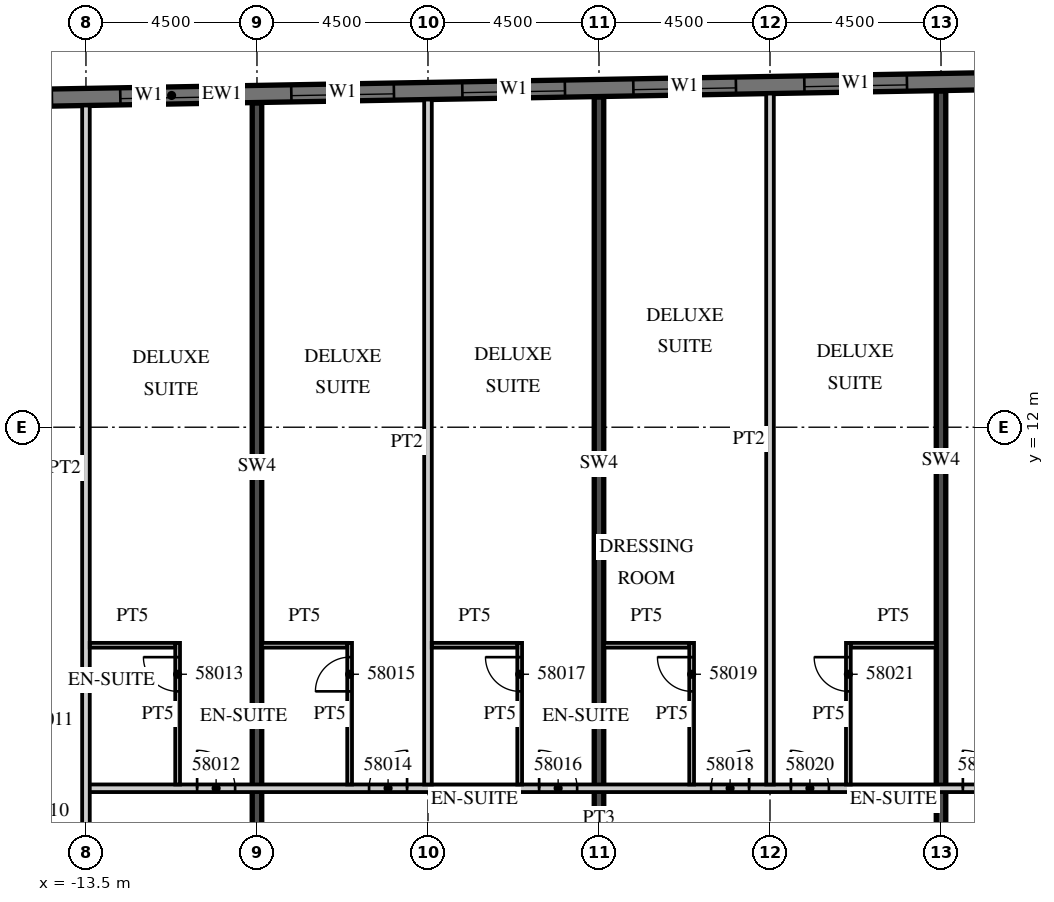
"""IFC4 building model, lengths in metres.
Left out: names, types, materials, properties, quantities, classifications, styles, units other than length and angle.
Written with IfcOpenShell. Run it as: python <this file> out.ifc"""

import sys

from ifc_helpers import new_model, si_unit, direction, frame, frame_2d, origin, place, context, subcontext, project, spatial, rectangle, extrude, element, fill, save


model = new_model("IFC4")
c1 = context("Model", 3, precision=1e-05, world=origin(), true_north=direction((0.0, 1.0)))
c2 = subcontext(c1, "Body", "Model", "MODEL_VIEW")
j1 = project(units=[si_unit("LENGTHUNIT", "METRE"), si_unit("PLANEANGLEUNIT", "RADIAN")], contexts=[c1])
p1 = place(None, origin())
s1 = spatial("IfcSite", under=j1, at=p1, CompositionType="ELEMENT")
p2 = place(p1, origin())
s2 = spatial("IfcBuilding", under=s1, at=p2, CompositionType="ELEMENT")
p3 = place(p2, frame((0.0, 0.0, 237.5)))
s3 = spatial("IfcBuildingStorey", under=s2, at=p3, CompositionType="ELEMENT", Elevation=237.5)
p4 = place(p3, frame((-9.0, 1.4, 0.0), z_axis=(0.0, 0.0, 1.0), x_axis=(0.0, 1.0, 0.0)))
e1 = element("IfcWall", 1, at=p4, inside=s3, PredefinedType="SHEAR", context=c2, shape_type="SweptSolid", body=[
    extrude(rectangle(XDim=19.132, YDim=0.25, at=frame_2d((9.566, 0.0))), origin(), (0.0, 0.0, 1.0), 3.3),
])
p5 = place(p3, frame((0.0, 1.4, 0.0), z_axis=(0.0, 0.0, 1.0), x_axis=(0.0, 1.0, 0.0)))
e2 = element("IfcWall", 2, at=p5, inside=s3, PredefinedType="SHEAR", context=c2, shape_type="SweptSolid", body=[
    extrude(rectangle(XDim=19.289, YDim=0.25, at=frame_2d((9.644, 0.0))), origin(), (0.0, 0.0, 1.0), 3.3),
])
p6 = place(p3, frame((9.0, 1.4, 0.0), z_axis=(0.0, 0.0, 1.0), x_axis=(0.0, 1.0, 0.0)))
e3 = element("IfcWall", 3, at=p6, inside=s3, PredefinedType="SHEAR", context=c2, shape_type="SweptSolid", body=[
    extrude(rectangle(XDim=19.446, YDim=0.25, at=frame_2d((9.723, 0.0))), origin(), (0.0, 0.0, 1.0), 3.3),
])
p7 = place(p3, frame((13.504, 21.161, 0.0), z_axis=(0.0, 0.0, 1.0), x_axis=(-0.999847763257, -0.017448504532, 0.0)))
e4 = element("IfcWall", 4, at=p7, inside=s3, PredefinedType="SOLIDWALL", context=c2, shape_type="SweptSolid", body=[
    extrude(rectangle(XDim=46.859, YDim=0.45, at=frame_2d((23.43, 0.0))), origin(), (0.0, 0.0, 1.0), 3.02),
])
p8 = place(p7, frame((0.9, 0.0, 0.45)))
e5 = element("IfcOpeningElement", 5, at=p8, cuts=e4, PredefinedType="OPENING", context=c2, shape_type="SweptSolid", body=[
    extrude(rectangle(XDim=2.7, YDim=2.25, at=frame_2d((1.35, 1.125))), frame((0.0, 0.235, 0.0), z_axis=(0.0, -1.0, 0.0), x_axis=(1.0, 0.0, 0.0)), (0.0, 0.0, 1.0), 0.47),
])
p9 = place(p7, frame((5.401, 0.0, 0.45)))
e6 = element("IfcOpeningElement", 6, at=p9, cuts=e4, PredefinedType="OPENING", context=c2, shape_type="SweptSolid", body=[
    extrude(rectangle(XDim=2.7, YDim=2.25, at=frame_2d((1.35, 1.125))), frame((0.0, 0.235, 0.0), z_axis=(0.0, -1.0, 0.0), x_axis=(1.0, 0.0, 0.0)), (0.0, 0.0, 1.0), 0.47),
])
p10 = place(p7, frame((9.902, 0.0, 0.45)))
e7 = element("IfcOpeningElement", 7, at=p10, cuts=e4, PredefinedType="OPENING", context=c2, shape_type="SweptSolid", body=[
    extrude(rectangle(XDim=2.7, YDim=2.25, at=frame_2d((1.35, 1.125))), frame((0.0, 0.235, 0.0), z_axis=(0.0, -1.0, 0.0), x_axis=(1.0, 0.0, 0.0)), (0.0, 0.0, 1.0), 0.47),
])
p11 = place(p7, frame((14.402, 0.0, 0.45)))
e8 = element("IfcOpeningElement", 8, at=p11, cuts=e4, PredefinedType="OPENING", context=c2, shape_type="SweptSolid", body=[
    extrude(rectangle(XDim=2.7, YDim=2.25, at=frame_2d((1.35, 1.125))), frame((0.0, 0.235, 0.0), z_axis=(0.0, -1.0, 0.0), x_axis=(1.0, 0.0, 0.0)), (0.0, 0.0, 1.0), 0.47),
])
p12 = place(p7, frame((18.903, 0.0, 0.45)))
e9 = element("IfcOpeningElement", 9, at=p12, cuts=e4, PredefinedType="OPENING", context=c2, shape_type="SweptSolid", body=[
    extrude(rectangle(XDim=2.7, YDim=2.25, at=frame_2d((1.35, 1.125))), frame((0.0, 0.235, 0.0), z_axis=(0.0, -1.0, 0.0), x_axis=(1.0, 0.0, 0.0)), (0.0, 0.0, 1.0), 0.47),
])
p13 = place(p7, frame((23.404, 0.0, 0.45)))
e10 = element("IfcOpeningElement", 10, at=p13, cuts=e4, PredefinedType="OPENING", context=c2, shape_type="SweptSolid", body=[
    extrude(rectangle(XDim=2.7, YDim=2.25, at=frame_2d((1.35, 1.125))), frame((0.0, 0.235, 0.0), z_axis=(0.0, -1.0, 0.0), x_axis=(1.0, 0.0, 0.0)), (0.0, 0.0, 1.0), 0.47),
])
p14 = place(p7, frame((27.904, 0.0, 0.45)))
e11 = element("IfcOpeningElement", 11, at=p14, cuts=e4, PredefinedType="OPENING", context=c2, shape_type="SweptSolid", body=[
    extrude(rectangle(XDim=2.7, YDim=2.25, at=frame_2d((1.35, 1.125))), frame((0.0, 0.235, 0.0), z_axis=(0.0, -1.0, 0.0), x_axis=(1.0, 0.0, 0.0)), (0.0, 0.0, 1.0), 0.47),
])
p15 = place(p7, frame((32.405, 0.0, 0.45)))
e12 = element("IfcOpeningElement", 12, at=p15, cuts=e4, PredefinedType="OPENING", context=c2, shape_type="SweptSolid", body=[
    extrude(rectangle(XDim=2.7, YDim=2.25, at=frame_2d((1.35, 1.125))), frame((0.0, 0.235, 0.0), z_axis=(0.0, -1.0, 0.0), x_axis=(1.0, 0.0, 0.0)), (0.0, 0.0, 1.0), 0.47),
])
p16 = place(p7, frame((36.906, 0.0, 0.45)))
e13 = element("IfcOpeningElement", 13, at=p16, cuts=e4, PredefinedType="OPENING", context=c2, shape_type="SweptSolid", body=[
    extrude(rectangle(XDim=2.7, YDim=2.25, at=frame_2d((1.35, 1.125))), frame((0.0, 0.235, 0.0), z_axis=(0.0, -1.0, 0.0), x_axis=(1.0, 0.0, 0.0)), (0.0, 0.0, 1.0), 0.47),
])
p17 = place(p7, frame((41.406, 0.0, 0.45)))
e14 = element("IfcOpeningElement", 14, at=p17, cuts=e4, PredefinedType="OPENING", context=c2, shape_type="SweptSolid", body=[
    extrude(rectangle(XDim=2.7, YDim=2.25, at=frame_2d((1.35, 1.125))), frame((0.0, 0.235, 0.0), z_axis=(0.0, -1.0, 0.0), x_axis=(1.0, 0.0, 0.0)), (0.0, 0.0, 1.0), 0.47),
])
p18 = place(p3, frame((-13.5, 2.5, 0.0), z_axis=(0.0, 0.0, 1.0), x_axis=(1.0, 0.0, 0.0)))
e15 = element("IfcWall", 15, at=p18, inside=s3, PredefinedType="PARTITIONING", context=c2, shape_type="SweptSolid", body=[
    extrude(rectangle(XDim=27.0, YDim=0.2, at=frame_2d((13.5, 0.0))), origin(), (0.0, 0.0, 1.0), 3.02),
])
p19 = place(p18, frame((2.925, 0.0, 0.0)))
e16 = element("IfcOpeningElement", 16, at=p19, cuts=e15, PredefinedType="OPENING", context=c2, shape_type="SweptSolid", body=[
    extrude(rectangle(XDim=1.0, YDim=2.1, at=frame_2d((0.5, 1.05))), frame((0.0, 0.11, 0.0), z_axis=(0.0, -1.0, 0.0), x_axis=(1.0, 0.0, 0.0)), (0.0, 0.0, 1.0), 0.22),
])
p20 = place(p18, frame((7.45, 0.0, 0.0)))
e17 = element("IfcOpeningElement", 17, at=p20, cuts=e15, PredefinedType="OPENING", context=c2, shape_type="SweptSolid", body=[
    extrude(rectangle(XDim=1.0, YDim=2.1, at=frame_2d((0.5, 1.05))), frame((0.0, 0.11, 0.0), z_axis=(0.0, -1.0, 0.0), x_axis=(1.0, 0.0, 0.0)), (0.0, 0.0, 1.0), 0.22),
])
p21 = place(p18, frame((11.925, 0.0, 0.0)))
e18 = element("IfcOpeningElement", 18, at=p21, cuts=e15, PredefinedType="OPENING", context=c2, shape_type="SweptSolid", body=[
    extrude(rectangle(XDim=1.0, YDim=2.1, at=frame_2d((0.5, 1.05))), frame((0.0, 0.11, 0.0), z_axis=(0.0, -1.0, 0.0), x_axis=(1.0, 0.0, 0.0)), (0.0, 0.0, 1.0), 0.22),
])
p22 = place(p18, frame((16.45, 0.0, 0.0)))
e19 = element("IfcOpeningElement", 19, at=p22, cuts=e15, PredefinedType="OPENING", context=c2, shape_type="SweptSolid", body=[
    extrude(rectangle(XDim=1.0, YDim=2.1, at=frame_2d((0.5, 1.05))), frame((0.0, 0.11, 0.0), z_axis=(0.0, -1.0, 0.0), x_axis=(1.0, 0.0, 0.0)), (0.0, 0.0, 1.0), 0.22),
])
p23 = place(p18, frame((18.55, 0.0, 0.0)))
e20 = element("IfcOpeningElement", 20, at=p23, cuts=e15, PredefinedType="OPENING", context=c2, shape_type="SweptSolid", body=[
    extrude(rectangle(XDim=1.0, YDim=2.1, at=frame_2d((0.5, 1.05))), frame((0.0, 0.11, 0.0), z_axis=(0.0, -1.0, 0.0), x_axis=(1.0, 0.0, 0.0)), (0.0, 0.0, 1.0), 0.22),
])
p24 = place(p18, frame((23.075, 0.0, 0.0)))
e21 = element("IfcOpeningElement", 21, at=p24, cuts=e15, PredefinedType="OPENING", context=c2, shape_type="SweptSolid", body=[
    extrude(rectangle(XDim=1.0, YDim=2.1, at=frame_2d((0.5, 1.05))), frame((0.0, 0.11, 0.0), z_axis=(0.0, -1.0, 0.0), x_axis=(1.0, 0.0, 0.0)), (0.0, 0.0, 1.0), 0.22),
])
p25 = place(p3, frame((-13.5, 1.4, 0.0), z_axis=(0.0, 0.0, 1.0), x_axis=(0.0, 1.0, 0.0)))
e22 = element("IfcWall", 22, at=p25, inside=s3, PredefinedType="PARTITIONING", context=c2, shape_type="SweptSolid", body=[
    extrude(rectangle(XDim=19.065, YDim=0.2, at=frame_2d((9.533, 0.0))), origin(), (0.0, 0.0, 1.0), 3.02),
])
p26 = place(p3, frame((-11.088, 2.6, 0.0), z_axis=(0.0, 0.0, 1.0), x_axis=(0.0, 1.0, 0.0)))
e23 = element("IfcWall", 23, at=p26, inside=s3, PredefinedType="PARTITIONING", context=c2, shape_type="SweptSolid", body=[
    extrude(rectangle(XDim=3.725, YDim=0.125, at=frame_2d((1.862, 0.0))), origin(), (0.0, 0.0, 1.0), 3.02),
])
p27 = place(p26, frame((2.45, 0.0, 0.0)))
e24 = element("IfcOpeningElement", 24, at=p27, cuts=e23, PredefinedType="OPENING", context=c2, shape_type="SweptSolid", body=[
    extrude(rectangle(XDim=0.9, YDim=2.1, at=frame_2d((0.45, 1.05))), frame((0.0, 0.073, 0.0), z_axis=(0.0, -1.0, 0.0), x_axis=(1.0, 0.0, 0.0)), (0.0, 0.0, 1.0), 0.145),
])
p28 = place(p3, frame((-13.4, 6.263, 0.0), z_axis=(0.0, 0.0, 1.0), x_axis=(1.0, 0.0, 0.0)))
e25 = element("IfcWall", 25, at=p28, inside=s3, PredefinedType="PARTITIONING", context=c2, shape_type="SweptSolid", body=[
    extrude(rectangle(XDim=2.25, YDim=0.125, at=frame_2d((1.125, 0.0))), origin(), (0.0, 0.0, 1.0), 3.02),
])
p29 = place(p3, frame((-4.5, 2.6, 0.0), z_axis=(0.0, 0.0, 1.0), x_axis=(0.0, 1.0, 0.0)))
e26 = element("IfcWall", 26, at=p29, inside=s3, PredefinedType="PARTITIONING", context=c2, shape_type="SweptSolid", body=[
    extrude(rectangle(XDim=18.022, YDim=0.2, at=frame_2d((9.011, 0.0))), origin(), (0.0, 0.0, 1.0), 3.02),
])
p30 = place(p3, frame((-6.562, 2.6, 0.0), z_axis=(0.0, 0.0, 1.0), x_axis=(0.0, 1.0, 0.0)))
e27 = element("IfcWall", 27, at=p30, inside=s3, PredefinedType="PARTITIONING", context=c2, shape_type="SweptSolid", body=[
    extrude(rectangle(XDim=3.725, YDim=0.125, at=frame_2d((1.862, 0.0))), origin(), (0.0, 0.0, 1.0), 3.02),
])
p31 = place(p30, frame((2.45, 0.0, 0.0)))
e28 = element("IfcOpeningElement", 28, at=p31, cuts=e27, PredefinedType="OPENING", context=c2, shape_type="SweptSolid", body=[
    extrude(rectangle(XDim=0.9, YDim=2.1, at=frame_2d((0.45, 1.05))), frame((0.0, 0.073, 0.0), z_axis=(0.0, -1.0, 0.0), x_axis=(1.0, 0.0, 0.0)), (0.0, 0.0, 1.0), 0.145),
])
p32 = place(p3, frame((-8.875, 6.263, 0.0), z_axis=(0.0, 0.0, 1.0), x_axis=(1.0, 0.0, 0.0)))
e29 = element("IfcWall", 29, at=p32, inside=s3, PredefinedType="PARTITIONING", context=c2, shape_type="SweptSolid", body=[
    extrude(rectangle(XDim=2.25, YDim=0.125, at=frame_2d((1.125, 0.0))), origin(), (0.0, 0.0, 1.0), 3.02),
])
p33 = place(p3, frame((-2.087, 2.6, 0.0), z_axis=(0.0, 0.0, 1.0), x_axis=(0.0, 1.0, 0.0)))
e30 = element("IfcWall", 30, at=p33, inside=s3, PredefinedType="PARTITIONING", context=c2, shape_type="SweptSolid", body=[
    extrude(rectangle(XDim=3.725, YDim=0.125, at=frame_2d((1.862, 0.0))), origin(), (0.0, 0.0, 1.0), 3.02),
])
p34 = place(p33, frame((2.45, 0.0, 0.0)))
e31 = element("IfcOpeningElement", 31, at=p34, cuts=e30, PredefinedType="OPENING", context=c2, shape_type="SweptSolid", body=[
    extrude(rectangle(XDim=0.9, YDim=2.1, at=frame_2d((0.45, 1.05))), frame((0.0, 0.073, 0.0), z_axis=(0.0, -1.0, 0.0), x_axis=(1.0, 0.0, 0.0)), (0.0, 0.0, 1.0), 0.145),
])
p35 = place(p3, frame((-4.4, 6.263, 0.0), z_axis=(0.0, 0.0, 1.0), x_axis=(1.0, 0.0, 0.0)))
e32 = element("IfcWall", 32, at=p35, inside=s3, PredefinedType="PARTITIONING", context=c2, shape_type="SweptSolid", body=[
    extrude(rectangle(XDim=2.25, YDim=0.125, at=frame_2d((1.125, 0.0))), origin(), (0.0, 0.0, 1.0), 3.02),
])
p36 = place(p3, frame((4.5, 2.6, 0.0), z_axis=(0.0, 0.0, 1.0), x_axis=(0.0, 1.0, 0.0)))
e33 = element("IfcWall", 33, at=p36, inside=s3, PredefinedType="PARTITIONING", context=c2, shape_type="SweptSolid", body=[
    extrude(rectangle(XDim=18.179, YDim=0.2, at=frame_2d((9.089, 0.0))), origin(), (0.0, 0.0, 1.0), 3.02),
])
p37 = place(p3, frame((2.438, 2.6, 0.0), z_axis=(0.0, 0.0, 1.0), x_axis=(0.0, 1.0, 0.0)))
e34 = element("IfcWall", 34, at=p37, inside=s3, PredefinedType="PARTITIONING", context=c2, shape_type="SweptSolid", body=[
    extrude(rectangle(XDim=3.725, YDim=0.125, at=frame_2d((1.862, 0.0))), origin(), (0.0, 0.0, 1.0), 3.02),
])
p38 = place(p37, frame((2.45, 0.0, 0.0)))
e35 = element("IfcOpeningElement", 35, at=p38, cuts=e34, PredefinedType="OPENING", context=c2, shape_type="SweptSolid", body=[
    extrude(rectangle(XDim=0.9, YDim=2.1, at=frame_2d((0.45, 1.05))), frame((0.0, 0.073, 0.0), z_axis=(0.0, -1.0, 0.0), x_axis=(1.0, 0.0, 0.0)), (0.0, 0.0, 1.0), 0.145),
])
p39 = place(p3, frame((0.125, 6.263, 0.0), z_axis=(0.0, 0.0, 1.0), x_axis=(1.0, 0.0, 0.0)))
e36 = element("IfcWall", 36, at=p39, inside=s3, PredefinedType="PARTITIONING", context=c2, shape_type="SweptSolid", body=[
    extrude(rectangle(XDim=2.25, YDim=0.125, at=frame_2d((1.125, 0.0))), origin(), (0.0, 0.0, 1.0), 3.02),
])
p40 = place(p3, frame((6.562, 2.6, 0.0), z_axis=(0.0, 0.0, 1.0), x_axis=(0.0, 1.0, 0.0)))
e37 = element("IfcWall", 37, at=p40, inside=s3, PredefinedType="PARTITIONING", context=c2, shape_type="SweptSolid", body=[
    extrude(rectangle(XDim=3.725, YDim=0.125, at=frame_2d((1.862, 0.0))), origin(), (0.0, 0.0, 1.0), 3.02),
])
p41 = place(p40, frame((2.45, 0.0, 0.0)))
e38 = element("IfcOpeningElement", 38, at=p41, cuts=e37, PredefinedType="OPENING", context=c2, shape_type="SweptSolid", body=[
    extrude(rectangle(XDim=0.9, YDim=2.1, at=frame_2d((0.45, 1.05))), frame((0.0, 0.073, 0.0), z_axis=(0.0, -1.0, 0.0), x_axis=(1.0, 0.0, 0.0)), (0.0, 0.0, 1.0), 0.145),
])
p42 = place(p3, frame((6.625, 6.263, 0.0), z_axis=(0.0, 0.0, 1.0), x_axis=(1.0, 0.0, 0.0)))
e39 = element("IfcWall", 39, at=p42, inside=s3, PredefinedType="PARTITIONING", context=c2, shape_type="SweptSolid", body=[
    extrude(rectangle(XDim=2.25, YDim=0.125, at=frame_2d((1.125, 0.0))), origin(), (0.0, 0.0, 1.0), 3.02),
])
p43 = place(p9, origin())
e40 = element("IfcWindow", 40, at=p43, inside=s3, PartitioningType="SINGLE_PANEL", PredefinedType="WINDOW", context=c2, shape_type="SweptSolid", body=[
    extrude(rectangle(XDim=2.7, YDim=2.25, at=frame_2d((1.35, 1.125))), frame((0.0, 0.09, 0.0), z_axis=(0.0, -1.0, 0.0), x_axis=(1.0, 0.0, 0.0)), (0.0, 0.0, 1.0), 0.06),
])
fill(e6, e40)
p44 = place(p10, origin())
e41 = element("IfcWindow", 41, at=p44, inside=s3, PartitioningType="SINGLE_PANEL", PredefinedType="WINDOW", context=c2, shape_type="SweptSolid", body=[
    extrude(rectangle(XDim=2.7, YDim=2.25, at=frame_2d((1.35, 1.125))), frame((0.0, 0.09, 0.0), z_axis=(0.0, -1.0, 0.0), x_axis=(1.0, 0.0, 0.0)), (0.0, 0.0, 1.0), 0.06),
])
fill(e7, e41)
p45 = place(p11, origin())
e42 = element("IfcWindow", 42, at=p45, inside=s3, PartitioningType="SINGLE_PANEL", PredefinedType="WINDOW", context=c2, shape_type="SweptSolid", body=[
    extrude(rectangle(XDim=2.7, YDim=2.25, at=frame_2d((1.35, 1.125))), frame((0.0, 0.09, 0.0), z_axis=(0.0, -1.0, 0.0), x_axis=(1.0, 0.0, 0.0)), (0.0, 0.0, 1.0), 0.06),
])
fill(e8, e42)
p46 = place(p12, origin())
e43 = element("IfcWindow", 43, at=p46, inside=s3, PartitioningType="SINGLE_PANEL", PredefinedType="WINDOW", context=c2, shape_type="SweptSolid", body=[
    extrude(rectangle(XDim=2.7, YDim=2.25, at=frame_2d((1.35, 1.125))), frame((0.0, 0.09, 0.0), z_axis=(0.0, -1.0, 0.0), x_axis=(1.0, 0.0, 0.0)), (0.0, 0.0, 1.0), 0.06),
])
fill(e9, e43)
p47 = place(p13, origin())
e44 = element("IfcWindow", 44, at=p47, inside=s3, PartitioningType="SINGLE_PANEL", PredefinedType="WINDOW", context=c2, shape_type="SweptSolid", body=[
    extrude(rectangle(XDim=2.7, YDim=2.25, at=frame_2d((1.35, 1.125))), frame((0.0, 0.09, 0.0), z_axis=(0.0, -1.0, 0.0), x_axis=(1.0, 0.0, 0.0)), (0.0, 0.0, 1.0), 0.06),
])
fill(e10, e44)
p48 = place(p14, origin())
e45 = element("IfcWindow", 45, at=p48, inside=s3, PartitioningType="SINGLE_PANEL", PredefinedType="WINDOW", context=c2, shape_type="SweptSolid", body=[
    extrude(rectangle(XDim=2.7, YDim=2.25, at=frame_2d((1.35, 1.125))), frame((0.0, 0.09, 0.0), z_axis=(0.0, -1.0, 0.0), x_axis=(1.0, 0.0, 0.0)), (0.0, 0.0, 1.0), 0.06),
])
fill(e11, e45)
p49 = place(p19, origin())
e46 = element("IfcDoor", 46, at=p49, inside=s3, OperationType="SINGLE_SWING_LEFT", PredefinedType="DOOR", context=c2, shape_type="SweptSolid", body=[
    extrude(rectangle(XDim=1.0, YDim=2.1, at=frame_2d((0.5, 1.05))), frame((0.0, 0.025, 0.0), z_axis=(0.0, -1.0, 0.0), x_axis=(1.0, 0.0, 0.0)), (0.0, 0.0, 1.0), 0.05),
])
fill(e16, e46)
p50 = place(p27, origin())
e47 = element("IfcDoor", 47, at=p50, inside=s3, OperationType="SINGLE_SWING_RIGHT", PredefinedType="DOOR", context=c2, shape_type="SweptSolid", body=[
    extrude(rectangle(XDim=0.9, YDim=2.1, at=frame_2d((0.45, 1.05))), frame((0.0, 0.025, 0.0), z_axis=(0.0, -1.0, 0.0), x_axis=(1.0, 0.0, 0.0)), (0.0, 0.0, 1.0), 0.05),
])
fill(e24, e47)
p51 = place(p20, origin())
e48 = element("IfcDoor", 48, at=p51, inside=s3, OperationType="SINGLE_SWING_RIGHT", PredefinedType="DOOR", context=c2, shape_type="SweptSolid", body=[
    extrude(rectangle(XDim=1.0, YDim=2.1, at=frame_2d((0.5, 1.05))), frame((0.0, 0.025, 0.0), z_axis=(0.0, -1.0, 0.0), x_axis=(1.0, 0.0, 0.0)), (0.0, 0.0, 1.0), 0.05),
])
fill(e17, e48)
p52 = place(p31, origin())
e49 = element("IfcDoor", 49, at=p52, inside=s3, OperationType="SINGLE_SWING_LEFT", PredefinedType="DOOR", context=c2, shape_type="SweptSolid", body=[
    extrude(rectangle(XDim=0.9, YDim=2.1, at=frame_2d((0.45, 1.05))), frame((0.0, 0.025, 0.0), z_axis=(0.0, -1.0, 0.0), x_axis=(1.0, 0.0, 0.0)), (0.0, 0.0, 1.0), 0.05),
])
fill(e28, e49)
p53 = place(p21, origin())
e50 = element("IfcDoor", 50, at=p53, inside=s3, OperationType="SINGLE_SWING_LEFT", PredefinedType="DOOR", context=c2, shape_type="SweptSolid", body=[
    extrude(rectangle(XDim=1.0, YDim=2.1, at=frame_2d((0.5, 1.05))), frame((0.0, 0.025, 0.0), z_axis=(0.0, -1.0, 0.0), x_axis=(1.0, 0.0, 0.0)), (0.0, 0.0, 1.0), 0.05),
])
fill(e18, e50)
p54 = place(p34, origin())
e51 = element("IfcDoor", 51, at=p54, inside=s3, OperationType="SINGLE_SWING_RIGHT", PredefinedType="DOOR", context=c2, shape_type="SweptSolid", body=[
    extrude(rectangle(XDim=0.9, YDim=2.1, at=frame_2d((0.45, 1.05))), frame((0.0, 0.025, 0.0), z_axis=(0.0, -1.0, 0.0), x_axis=(1.0, 0.0, 0.0)), (0.0, 0.0, 1.0), 0.05),
])
fill(e31, e51)
p55 = place(p22, origin())
e52 = element("IfcDoor", 52, at=p55, inside=s3, OperationType="SINGLE_SWING_RIGHT", PredefinedType="DOOR", context=c2, shape_type="SweptSolid", body=[
    extrude(rectangle(XDim=1.0, YDim=2.1, at=frame_2d((0.5, 1.05))), frame((0.0, 0.025, 0.0), z_axis=(0.0, -1.0, 0.0), x_axis=(1.0, 0.0, 0.0)), (0.0, 0.0, 1.0), 0.05),
])
fill(e19, e52)
p56 = place(p38, origin())
e53 = element("IfcDoor", 53, at=p56, inside=s3, OperationType="SINGLE_SWING_RIGHT", PredefinedType="DOOR", context=c2, shape_type="SweptSolid", body=[
    extrude(rectangle(XDim=0.9, YDim=2.1, at=frame_2d((0.45, 1.05))), frame((0.0, 0.025, 0.0), z_axis=(0.0, -1.0, 0.0), x_axis=(1.0, 0.0, 0.0)), (0.0, 0.0, 1.0), 0.05),
])
fill(e35, e53)
p57 = place(p23, origin())
e54 = element("IfcDoor", 54, at=p57, inside=s3, OperationType="SINGLE_SWING_LEFT", PredefinedType="DOOR", context=c2, shape_type="SweptSolid", body=[
    extrude(rectangle(XDim=1.0, YDim=2.1, at=frame_2d((0.5, 1.05))), frame((0.0, 0.025, 0.0), z_axis=(0.0, -1.0, 0.0), x_axis=(1.0, 0.0, 0.0)), (0.0, 0.0, 1.0), 0.05),
])
fill(e20, e54)
p58 = place(p41, origin())
e55 = element("IfcDoor", 55, at=p58, inside=s3, OperationType="SINGLE_SWING_RIGHT", PredefinedType="DOOR", context=c2, shape_type="SweptSolid", body=[
    extrude(rectangle(XDim=0.9, YDim=2.1, at=frame_2d((0.45, 1.05))), frame((0.0, 0.025, 0.0), z_axis=(0.0, -1.0, 0.0), x_axis=(1.0, 0.0, 0.0)), (0.0, 0.0, 1.0), 0.05),
])
fill(e38, e55)
p59 = place(p24, origin())
e56 = element("IfcDoor", 56, at=p59, inside=s3, OperationType="SINGLE_SWING_LEFT", PredefinedType="DOOR", context=c2, shape_type="SweptSolid", body=[
    extrude(rectangle(XDim=1.0, YDim=2.1, at=frame_2d((0.5, 1.05))), frame((0.0, 0.025, 0.0), z_axis=(0.0, -1.0, 0.0), x_axis=(1.0, 0.0, 0.0)), (0.0, 0.0, 1.0), 0.05),
])
fill(e21, e56)
save(model, sys.argv[1])
